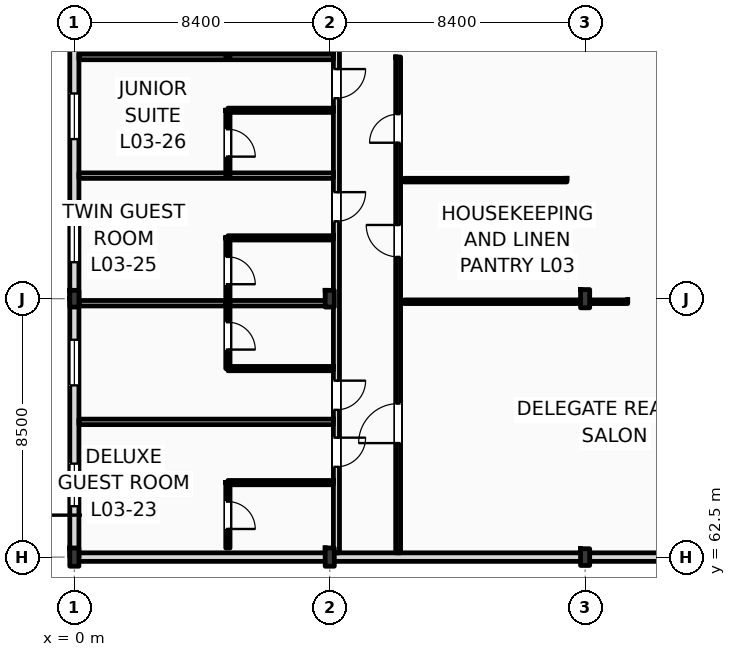
"""IFC4 building model, lengths in metres.
Left out: names, types, materials, properties, quantities, classifications, styles, units other than length and angle.
Written with IfcOpenShell. Run it as: python <this file> out.ifc"""

import sys

from ifc_helpers import new_model, si_unit, direction, frame, frame_2d, origin, origin_2d, place, context, subcontext, project, spatial, rectangle, i_section, extrude, element, fill, save


model = new_model("IFC4")
c1 = context("Model", 3, precision=1e-05, world=origin(), true_north=direction((0.0, 1.0)))
c2 = subcontext(c1, "Body", "Model", "MODEL_VIEW")
j1 = project(units=[si_unit("LENGTHUNIT", "METRE"), si_unit("PLANEANGLEUNIT", "RADIAN")], contexts=[c1])
p1 = place(None, origin())
s1 = spatial("IfcSite", under=j1, at=p1, CompositionType="ELEMENT")
p2 = place(p1, origin())
s2 = spatial("IfcBuilding", under=s1, at=p2, CompositionType="ELEMENT")
p3 = place(p2, frame((0.0, 0.0, 16.2)))
s3 = spatial("IfcBuildingStorey", under=s2, at=p3, CompositionType="ELEMENT", Elevation=16.2)
p4 = place(p3, frame((0.0, 62.5, 0.0), z_axis=(0.0, 0.0, 1.0), x_axis=(1.0, 0.0, 0.0)))
e1 = element("IfcColumn", 1, at=p4, inside=s3, PredefinedType="COLUMN", context=c2, shape_type="SweptSolid", body=[
    extrude(i_section(OverallWidth=0.3, OverallDepth=0.6, WebThickness=0.015, FlangeThickness=0.03, FilletRadius=0.027, at=origin_2d()), origin(), (0.0, 0.0, 1.0), 4.2),
])
p5 = place(p3, frame((0.0, 71.0, 0.0), z_axis=(0.0, 0.0, 1.0), x_axis=(1.0, 0.0, 0.0)))
e2 = element("IfcColumn", 2, at=p5, inside=s3, PredefinedType="COLUMN", context=c2, shape_type="SweptSolid", body=[
    extrude(i_section(OverallWidth=0.3, OverallDepth=0.55, WebThickness=0.015, FlangeThickness=0.029, FilletRadius=0.027, at=origin_2d()), origin(), (0.0, 0.0, 1.0), 4.2),
])
p6 = place(p3, frame((8.4, 62.5, 0.0), z_axis=(0.0, 0.0, 1.0), x_axis=(1.0, 0.0, 0.0)))
e3 = element("IfcColumn", 3, at=p6, inside=s3, PredefinedType="COLUMN", context=c2, shape_type="SweptSolid", body=[
    extrude(i_section(OverallWidth=0.3, OverallDepth=0.6, WebThickness=0.015, FlangeThickness=0.03, FilletRadius=0.027, at=origin_2d()), origin(), (0.0, 0.0, 1.0), 4.2),
])
for number, where, z_axis, x_axis in (
    (4, (8.4, 71.0, 0.0), (0.0, 0.0, 1.0), (1.0, 0.0, 0.0)),
    (5, (16.8, 62.5, 0.0), (0.0, 0.0, 1.0), (1.0, 0.0, 0.0)),
):
    element("IfcColumn", number, at=place(p3, frame(where, z_axis=z_axis, x_axis=x_axis)), inside=s3, PredefinedType="COLUMN", context=c2, shape_type="SweptSolid", body=[
        extrude(i_section(OverallWidth=0.3, OverallDepth=0.55, WebThickness=0.015, FlangeThickness=0.029, FilletRadius=0.027, at=origin_2d()), origin(), (0.0, 0.0, 1.0), 4.2),
    ])
p7 = place(p3, frame((16.8, 71.0, 0.0), z_axis=(0.0, 0.0, 1.0), x_axis=(1.0, 0.0, 0.0)))
e6 = element("IfcColumn", 6, at=p7, inside=s3, PredefinedType="COLUMN", context=c2, shape_type="SweptSolid", body=[
    extrude(i_section(OverallWidth=0.3, OverallDepth=0.6, WebThickness=0.015, FlangeThickness=0.03, FilletRadius=0.027, at=origin_2d()), origin(), (0.0, 0.0, 1.0), 4.2),
])
p8 = place(p3, frame((0.0, 62.5, 0.0), z_axis=(0.0, 0.0, 1.0), x_axis=(0.0, 1.0, 0.0)))
e7 = element("IfcWall", 7, at=p8, inside=s3, PredefinedType="STANDARD", context=c2, shape_type="SweptSolid", body=[
    extrude(rectangle(XDim=8.5, YDim=0.3, at=frame_2d((4.25, 0.0))), origin(), (0.0, 0.0, 1.0), 3.51),
])
p9 = place(p8, frame((1.674, 0.0, 0.9)))
e8 = element("IfcOpeningElement", 8, at=p9, cuts=e7, PredefinedType="OPENING", context=c2, shape_type="SweptSolid", body=[
    extrude(rectangle(XDim=1.4, YDim=1.7, at=frame_2d((0.7, 0.85))), frame((0.0, 0.16, 0.0), z_axis=(0.0, -1.0, 0.0), x_axis=(1.0, 0.0, 0.0)), (0.0, 0.0, 1.0), 0.32),
])
p10 = place(p8, frame((5.649, 0.0, 0.9)))
e9 = element("IfcOpeningElement", 9, at=p10, cuts=e7, PredefinedType="OPENING", context=c2, shape_type="SweptSolid", body=[
    extrude(rectangle(XDim=1.5, YDim=1.75, at=frame_2d((0.75, 0.875))), frame((0.0, 0.16, 0.0), z_axis=(0.0, -1.0, 0.0), x_axis=(1.0, 0.0, 0.0)), (0.0, 0.0, 1.0), 0.32),
])
p11 = place(p3, frame((0.0, 71.0, 0.0), z_axis=(0.0, 0.0, 1.0), x_axis=(0.0, 1.0, 0.0)))
e10 = element("IfcWall", 10, at=p11, inside=s3, PredefinedType="STANDARD", context=c2, shape_type="SweptSolid", body=[
    extrude(rectangle(XDim=8.5, YDim=0.3, at=frame_2d((4.25, 0.0))), origin(), (0.0, 0.0, 1.0), 3.51),
])
p12 = place(p11, frame((1.2, 0.0, 0.9)))
e11 = element("IfcOpeningElement", 11, at=p12, cuts=e10, PredefinedType="OPENING", context=c2, shape_type="SweptSolid", body=[
    extrude(rectangle(XDim=1.5, YDim=2.3, at=frame_2d((0.75, 1.15))), frame((0.0, 0.16, 0.0), z_axis=(0.0, -1.0, 0.0), x_axis=(1.0, 0.0, 0.0)), (0.0, 0.0, 1.0), 0.32),
])
p13 = place(p11, frame((5.25, 0.0, 0.9)))
e12 = element("IfcOpeningElement", 12, at=p13, cuts=e10, PredefinedType="OPENING", context=c2, shape_type="SweptSolid", body=[
    extrude(rectangle(XDim=1.5, YDim=2.43, at=frame_2d((0.75, 1.215))), frame((0.0, 0.16, 0.0), z_axis=(0.0, -1.0, 0.0), x_axis=(1.0, 0.0, 0.0)), (0.0, 0.0, 1.0), 0.32),
])
p14 = place(p3, frame((0.0, 62.5, 0.0), z_axis=(0.0, 0.0, 1.0), x_axis=(1.0, 0.0, 0.0)))
e13 = element("IfcWall", 13, at=p14, inside=s3, PredefinedType="STANDARD", context=c2, shape_type="SweptSolid", body=[
    extrude(rectangle(XDim=25.2, YDim=0.28, at=frame_2d((12.6, 0.0))), origin(), (0.0, 0.0, 1.0), 3.36),
])
p15 = place(p3, frame((8.62, 62.64, 0.0), z_axis=(0.0, 0.0, 1.0), x_axis=(0.0, 1.0, 0.0)))
e14 = element("IfcWall", 14, at=p15, inside=s3, PredefinedType="PARTITIONING", context=c2, shape_type="SweptSolid", body=[
    extrude(rectangle(XDim=32.66, YDim=0.2, at=frame_2d((16.33, 0.0))), origin(), (0.0, 0.0, 1.0), 3.51),
])
p16 = place(p15, frame((2.829, 0.0, 0.0)))
e15 = element("IfcOpeningElement", 15, at=p16, cuts=e14, PredefinedType="OPENING", context=c2, shape_type="SweptSolid", body=[
    extrude(rectangle(XDim=0.96, YDim=2.2, at=frame_2d((0.48, 1.1))), frame((0.0, 0.11, 0.0), z_axis=(0.0, -1.0, 0.0), x_axis=(1.0, 0.0, 0.0)), (0.0, 0.0, 1.0), 0.22),
])
p17 = place(p15, frame((4.704, 0.0, 0.0)))
e16 = element("IfcOpeningElement", 16, at=p17, cuts=e14, PredefinedType="OPENING", context=c2, shape_type="SweptSolid", body=[
    extrude(rectangle(XDim=0.96, YDim=2.2, at=frame_2d((0.48, 1.1))), frame((0.0, 0.11, 0.0), z_axis=(0.0, -1.0, 0.0), x_axis=(1.0, 0.0, 0.0)), (0.0, 0.0, 1.0), 0.22),
])
p18 = place(p15, frame((10.905, 0.0, 0.0)))
e17 = element("IfcOpeningElement", 17, at=p18, cuts=e14, PredefinedType="OPENING", context=c2, shape_type="SweptSolid", body=[
    extrude(rectangle(XDim=0.96, YDim=2.2, at=frame_2d((0.48, 1.1))), frame((0.0, 0.11, 0.0), z_axis=(0.0, -1.0, 0.0), x_axis=(1.0, 0.0, 0.0)), (0.0, 0.0, 1.0), 0.22),
])
p19 = place(p15, frame((14.954, 0.0, 0.0)))
e18 = element("IfcOpeningElement", 18, at=p19, cuts=e14, PredefinedType="OPENING", context=c2, shape_type="SweptSolid", body=[
    extrude(rectangle(XDim=0.96, YDim=2.2, at=frame_2d((0.48, 1.1))), frame((0.0, 0.11, 0.0), z_axis=(0.0, -1.0, 0.0), x_axis=(1.0, 0.0, 0.0)), (0.0, 0.0, 1.0), 0.22),
])
p20 = place(p15, frame((19.004, 0.0, 0.0)))
e19 = element("IfcOpeningElement", 19, at=p20, cuts=e14, PredefinedType="OPENING", context=c2, shape_type="SweptSolid", body=[
    extrude(rectangle(XDim=0.96, YDim=2.2, at=frame_2d((0.48, 1.1))), frame((0.0, 0.11, 0.0), z_axis=(0.0, -1.0, 0.0), x_axis=(1.0, 0.0, 0.0)), (0.0, 0.0, 1.0), 0.22),
])
p21 = place(p15, frame((23.055, 0.0, 0.0)))
e20 = element("IfcOpeningElement", 20, at=p21, cuts=e14, PredefinedType="OPENING", context=c2, shape_type="SweptSolid", body=[
    extrude(rectangle(XDim=0.96, YDim=2.2, at=frame_2d((0.48, 1.1))), frame((0.0, 0.11, 0.0), z_axis=(0.0, -1.0, 0.0), x_axis=(1.0, 0.0, 0.0)), (0.0, 0.0, 1.0), 0.22),
])
p22 = place(p15, frame((27.104, 0.0, 0.0)))
e21 = element("IfcOpeningElement", 21, at=p22, cuts=e14, PredefinedType="OPENING", context=c2, shape_type="SweptSolid", body=[
    extrude(rectangle(XDim=0.96, YDim=2.2, at=frame_2d((0.48, 1.1))), frame((0.0, 0.11, 0.0), z_axis=(0.0, -1.0, 0.0), x_axis=(1.0, 0.0, 0.0)), (0.0, 0.0, 1.0), 0.22),
])
p23 = place(p15, frame((31.179, 0.0, 0.0)))
e22 = element("IfcOpeningElement", 22, at=p23, cuts=e14, PredefinedType="OPENING", context=c2, shape_type="SweptSolid", body=[
    extrude(rectangle(XDim=0.96, YDim=2.2, at=frame_2d((0.48, 1.1))), frame((0.0, 0.11, 0.0), z_axis=(0.0, -1.0, 0.0), x_axis=(1.0, 0.0, 0.0)), (0.0, 0.0, 1.0), 0.22),
])
p24 = place(p3, frame((10.65, 62.64, 0.0), z_axis=(0.0, 0.0, 1.0), x_axis=(0.0, 1.0, 0.0)))
e23 = element("IfcWall", 23, at=p24, inside=s3, PredefinedType="PARTITIONING", context=c2, shape_type="SweptSolid", body=[
    extrude(rectangle(XDim=16.31, YDim=0.16, at=frame_2d((8.155, 0.0))), origin(), (0.0, 0.0, 1.0), 3.92),
])
p25 = place(p24, frame((3.61, 0.0, 0.0)))
e24 = element("IfcOpeningElement", 24, at=p25, cuts=e23, PredefinedType="OPENING", context=c2, shape_type="SweptSolid", body=[
    extrude(rectangle(XDim=1.3, YDim=2.2, at=frame_2d((0.65, 1.1))), frame((0.0, 0.09, 0.0), z_axis=(0.0, -1.0, 0.0), x_axis=(1.0, 0.0, 0.0)), (0.0, 0.0, 1.0), 0.18),
])
p26 = place(p24, frame((9.735, 0.0, 0.0)))
e25 = element("IfcOpeningElement", 25, at=p26, cuts=e23, PredefinedType="OPENING", context=c2, shape_type="SweptSolid", body=[
    extrude(rectangle(XDim=1.05, YDim=2.12, at=frame_2d((0.525, 1.06))), frame((0.0, 0.09, 0.0), z_axis=(0.0, -1.0, 0.0), x_axis=(1.0, 0.0, 0.0)), (0.0, 0.0, 1.0), 0.18),
])
p27 = place(p24, frame((13.49, 0.0, 0.0)))
e26 = element("IfcOpeningElement", 26, at=p27, cuts=e23, PredefinedType="OPENING", context=c2, shape_type="SweptSolid", body=[
    extrude(rectangle(XDim=0.94, YDim=2.15, at=frame_2d((0.47, 1.075))), frame((0.0, 0.09, 0.0), z_axis=(0.0, -1.0, 0.0), x_axis=(1.0, 0.0, 0.0)), (0.0, 0.0, 1.0), 0.18),
])
p28 = place(p3, frame((0.15, 66.948, 0.0), z_axis=(0.0, 0.0, 1.0), x_axis=(1.0, 0.0, 0.0)))
e27 = element("IfcWall", 27, at=p28, inside=s3, PredefinedType="PARTITIONING", context=c2, shape_type="SweptSolid", body=[
    extrude(rectangle(XDim=8.37, YDim=0.18, at=frame_2d((4.185, 0.0))), origin(), (0.0, 0.0, 1.0), 3.92),
])
p29 = place(p3, frame((5.05, 64.95, 0.0), z_axis=(0.0, 0.0, 1.0), x_axis=(1.0, 0.0, 0.0)))
e28 = element("IfcWall", 28, at=p29, inside=s3, PredefinedType="PARTITIONING", context=c2, shape_type="SweptSolid", body=[
    extrude(rectangle(XDim=3.47, YDim=0.14, at=frame_2d((1.735, 0.0))), origin(), (0.0, 0.0, 1.0), 3.92),
])
p30 = place(p3, frame((5.05, 62.8, 0.0), z_axis=(0.0, 0.0, 1.0), x_axis=(0.0, 1.0, 0.0)))
e29 = element("IfcWall", 29, at=p30, inside=s3, PredefinedType="PARTITIONING", context=c2, shape_type="SweptSolid", body=[
    extrude(rectangle(XDim=2.15, YDim=0.14, at=frame_2d((1.075, 0.0))), origin(), (0.0, 0.0, 1.0), 3.92),
])
p31 = place(p30, frame((0.625, 0.0, 0.0)))
e30 = element("IfcOpeningElement", 30, at=p31, cuts=e29, PredefinedType="OPENING", context=c2, shape_type="SweptSolid", body=[
    extrude(rectangle(XDim=0.9, YDim=2.1, at=frame_2d((0.45, 1.05))), frame((0.0, 0.08, 0.0), z_axis=(0.0, -1.0, 0.0), x_axis=(1.0, 0.0, 0.0)), (0.0, 0.0, 1.0), 0.16),
])
p32 = place(p3, frame((0.15, 70.851, 0.0), z_axis=(0.0, 0.0, 1.0), x_axis=(1.0, 0.0, 0.0)))
e31 = element("IfcWall", 31, at=p32, inside=s3, PredefinedType="PARTITIONING", context=c2, shape_type="SweptSolid", body=[
    extrude(rectangle(XDim=8.37, YDim=0.18, at=frame_2d((4.185, 0.0))), origin(), (0.0, 0.0, 1.0), 3.36),
])
p33 = place(p3, frame((5.05, 68.701, 0.0), z_axis=(0.0, 0.0, 1.0), x_axis=(1.0, 0.0, 0.0)))
e32 = element("IfcWall", 32, at=p33, inside=s3, PredefinedType="PARTITIONING", context=c2, shape_type="SweptSolid", body=[
    extrude(rectangle(XDim=3.47, YDim=0.14, at=frame_2d((1.735, 0.0))), origin(), (0.0, 0.0, 1.0), 3.92),
])
p34 = place(p3, frame((5.05, 68.701, 0.0), z_axis=(0.0, 0.0, 1.0), x_axis=(0.0, 1.0, 0.0)))
e33 = element("IfcWall", 33, at=p34, inside=s3, PredefinedType="PARTITIONING", context=c2, shape_type="SweptSolid", body=[
    extrude(rectangle(XDim=2.15, YDim=0.14, at=frame_2d((1.075, 0.0))), origin(), (0.0, 0.0, 1.0), 3.92),
])
p35 = place(p34, frame((0.625, 0.0, 0.0)))
e34 = element("IfcOpeningElement", 34, at=p35, cuts=e33, PredefinedType="OPENING", context=c2, shape_type="SweptSolid", body=[
    extrude(rectangle(XDim=0.9, YDim=2.1, at=frame_2d((0.45, 1.05))), frame((0.0, 0.08, 0.0), z_axis=(0.0, -1.0, 0.0), x_axis=(1.0, 0.0, 0.0)), (0.0, 0.0, 1.0), 0.16),
])
p36 = place(p3, frame((0.15, 75.048, 0.0), z_axis=(0.0, 0.0, 1.0), x_axis=(1.0, 0.0, 0.0)))
e35 = element("IfcWall", 35, at=p36, inside=s3, PredefinedType="PARTITIONING", context=c2, shape_type="SweptSolid", body=[
    extrude(rectangle(XDim=8.37, YDim=0.18, at=frame_2d((4.185, 0.0))), origin(), (0.0, 0.0, 1.0), 3.92),
])
p37 = place(p3, frame((5.05, 73.001, 0.0), z_axis=(0.0, 0.0, 1.0), x_axis=(1.0, 0.0, 0.0)))
e36 = element("IfcWall", 36, at=p37, inside=s3, PredefinedType="PARTITIONING", context=c2, shape_type="SweptSolid", body=[
    extrude(rectangle(XDim=3.47, YDim=0.14, at=frame_2d((1.735, 0.0))), origin(), (0.0, 0.0, 1.0), 3.92),
])
p38 = place(p3, frame((5.05, 70.851, 0.0), z_axis=(0.0, 0.0, 1.0), x_axis=(0.0, 1.0, 0.0)))
e37 = element("IfcWall", 37, at=p38, inside=s3, PredefinedType="PARTITIONING", context=c2, shape_type="SweptSolid", body=[
    extrude(rectangle(XDim=2.15, YDim=0.14, at=frame_2d((1.075, 0.0))), origin(), (0.0, 0.0, 1.0), 3.92),
])
p39 = place(p38, frame((0.625, 0.0, 0.0)))
e38 = element("IfcOpeningElement", 38, at=p39, cuts=e37, PredefinedType="OPENING", context=c2, shape_type="SweptSolid", body=[
    extrude(rectangle(XDim=0.9, YDim=2.1, at=frame_2d((0.45, 1.05))), frame((0.0, 0.08, 0.0), z_axis=(0.0, -1.0, 0.0), x_axis=(1.0, 0.0, 0.0)), (0.0, 0.0, 1.0), 0.16),
])
p40 = place(p3, frame((0.15, 78.951, 0.0), z_axis=(0.0, 0.0, 1.0), x_axis=(1.0, 0.0, 0.0)))
e39 = element("IfcWall", 39, at=p40, inside=s3, PredefinedType="PARTITIONING", context=c2, shape_type="SweptSolid", body=[
    extrude(rectangle(XDim=8.37, YDim=0.18, at=frame_2d((4.185, 0.0))), origin(), (0.0, 0.0, 1.0), 3.92),
])
p41 = place(p3, frame((5.05, 77.198, 0.0), z_axis=(0.0, 0.0, 1.0), x_axis=(1.0, 0.0, 0.0)))
e40 = element("IfcWall", 40, at=p41, inside=s3, PredefinedType="PARTITIONING", context=c2, shape_type="SweptSolid", body=[
    extrude(rectangle(XDim=3.47, YDim=0.14, at=frame_2d((1.735, 0.0))), origin(), (0.0, 0.0, 1.0), 3.92),
])
p42 = place(p3, frame((5.05, 75.048, 0.0), z_axis=(0.0, 0.0, 1.0), x_axis=(0.0, 1.0, 0.0)))
e41 = element("IfcWall", 41, at=p42, inside=s3, PredefinedType="PARTITIONING", context=c2, shape_type="SweptSolid", body=[
    extrude(rectangle(XDim=2.15, YDim=0.14, at=frame_2d((1.075, 0.0))), origin(), (0.0, 0.0, 1.0), 3.92),
])
p43 = place(p42, frame((0.625, 0.0, 0.0)))
e42 = element("IfcOpeningElement", 42, at=p43, cuts=e41, PredefinedType="OPENING", context=c2, shape_type="SweptSolid", body=[
    extrude(rectangle(XDim=0.9, YDim=2.1, at=frame_2d((0.45, 1.05))), frame((0.0, 0.08, 0.0), z_axis=(0.0, -1.0, 0.0), x_axis=(1.0, 0.0, 0.0)), (0.0, 0.0, 1.0), 0.16),
])
p44 = place(p3, frame((5.05, 78.951, 0.0), z_axis=(0.0, 0.0, 1.0), x_axis=(0.0, 1.0, 0.0)))
e43 = element("IfcWall", 43, at=p44, inside=s3, PredefinedType="PARTITIONING", context=c2, shape_type="SweptSolid", body=[
    extrude(rectangle(XDim=2.15, YDim=0.14, at=frame_2d((1.075, 0.0))), origin(), (0.0, 0.0, 1.0), 3.92),
])
p45 = place(p44, frame((0.625, 0.0, 0.0)))
e44 = element("IfcOpeningElement", 44, at=p45, cuts=e43, PredefinedType="OPENING", context=c2, shape_type="SweptSolid", body=[
    extrude(rectangle(XDim=0.9, YDim=2.1, at=frame_2d((0.45, 1.05))), frame((0.0, 0.08, 0.0), z_axis=(0.0, -1.0, 0.0), x_axis=(1.0, 0.0, 0.0)), (0.0, 0.0, 1.0), 0.16),
])
p46 = place(p3, frame((10.85, 70.9, 0.0), z_axis=(0.0, 0.0, 1.0), x_axis=(1.0, 0.0, 0.0)))
e45 = element("IfcWall", 45, at=p46, inside=s3, PredefinedType="PARTITIONING", context=c2, shape_type="SweptSolid", body=[
    extrude(rectangle(XDim=7.35, YDim=0.12, at=frame_2d((3.675, 0.0))), origin(), (0.0, 0.0, 1.0), 3.36),
])
p47 = place(p3, frame((10.85, 74.9, 0.0), z_axis=(0.0, 0.0, 1.0), x_axis=(1.0, 0.0, 0.0)))
e46 = element("IfcWall", 46, at=p47, inside=s3, PredefinedType="PARTITIONING", context=c2, shape_type="SweptSolid", body=[
    extrude(rectangle(XDim=5.35, YDim=0.12, at=frame_2d((2.675, 0.0))), origin(), (0.0, 0.0, 1.0), 3.92),
])
p48 = place(p9, origin())
e47 = element("IfcWindow", 47, at=p48, inside=s3, PartitioningType="DOUBLE_PANEL_VERTICAL", PredefinedType="WINDOW", context=c2, shape_type="SweptSolid", body=[
    extrude(rectangle(XDim=1.4, YDim=1.7, at=frame_2d((0.7, 0.85))), frame((0.0, 0.03, 0.0), z_axis=(0.0, -1.0, 0.0), x_axis=(1.0, 0.0, 0.0)), (0.0, 0.0, 1.0), 0.06),
])
fill(e8, e47)
p49 = place(p10, origin())
e48 = element("IfcWindow", 48, at=p49, inside=s3, PartitioningType="DOUBLE_PANEL_VERTICAL", PredefinedType="WINDOW", context=c2, shape_type="SweptSolid", body=[
    extrude(rectangle(XDim=1.5, YDim=1.75, at=frame_2d((0.75, 0.875))), frame((0.0, 0.03, 0.0), z_axis=(0.0, -1.0, 0.0), x_axis=(1.0, 0.0, 0.0)), (0.0, 0.0, 1.0), 0.06),
])
fill(e9, e48)
p50 = place(p12, origin())
e49 = element("IfcWindow", 49, at=p50, inside=s3, PartitioningType="DOUBLE_PANEL_VERTICAL", PredefinedType="WINDOW", context=c2, shape_type="SweptSolid", body=[
    extrude(rectangle(XDim=1.5, YDim=2.3, at=frame_2d((0.75, 1.15))), frame((0.0, 0.03, 0.0), z_axis=(0.0, -1.0, 0.0), x_axis=(1.0, 0.0, 0.0)), (0.0, 0.0, 1.0), 0.06),
])
fill(e11, e49)
p51 = place(p13, origin())
e50 = element("IfcWindow", 50, at=p51, inside=s3, PartitioningType="DOUBLE_PANEL_VERTICAL", PredefinedType="WINDOW", context=c2, shape_type="SweptSolid", body=[
    extrude(rectangle(XDim=1.5, YDim=2.43, at=frame_2d((0.75, 1.215))), frame((0.0, 0.03, 0.0), z_axis=(0.0, -1.0, 0.0), x_axis=(1.0, 0.0, 0.0)), (0.0, 0.0, 1.0), 0.06),
])
fill(e12, e50)
p52 = place(p16, frame((0.96, 0.0, 0.0), z_axis=(0.0, 0.0, 1.0), x_axis=(-1.0, 0.0, 0.0)))
e51 = element("IfcDoor", 51, at=p52, inside=s3, OperationType="SINGLE_SWING_RIGHT", PredefinedType="DOOR", context=c2, shape_type="SweptSolid", body=[
    extrude(rectangle(XDim=0.96, YDim=2.2, at=frame_2d((0.48, 1.1))), frame((0.0, 0.025, 0.0), z_axis=(0.0, -1.0, 0.0), x_axis=(1.0, 0.0, 0.0)), (0.0, 0.0, 1.0), 0.05),
])
fill(e15, e51)
p53 = place(p31, frame((0.9, 0.0, 0.0), z_axis=(0.0, 0.0, 1.0), x_axis=(-1.0, 0.0, 0.0)))
e52 = element("IfcDoor", 52, at=p53, inside=s3, OperationType="SINGLE_SWING_LEFT", PredefinedType="DOOR", context=c2, shape_type="SweptSolid", body=[
    extrude(rectangle(XDim=0.9, YDim=2.1, at=frame_2d((0.45, 1.05))), frame((0.0, 0.025, 0.0), z_axis=(0.0, -1.0, 0.0), x_axis=(1.0, 0.0, 0.0)), (0.0, 0.0, 1.0), 0.05),
])
fill(e30, e52)
p54 = place(p17, frame((0.96, 0.0, 0.0), z_axis=(0.0, 0.0, 1.0), x_axis=(-1.0, 0.0, 0.0)))
e53 = element("IfcDoor", 53, at=p54, inside=s3, OperationType="SINGLE_SWING_RIGHT", PredefinedType="DOOR", context=c2, shape_type="SweptSolid", body=[
    extrude(rectangle(XDim=0.96, YDim=2.2, at=frame_2d((0.48, 1.1))), frame((0.0, 0.025, 0.0), z_axis=(0.0, -1.0, 0.0), x_axis=(1.0, 0.0, 0.0)), (0.0, 0.0, 1.0), 0.05),
])
fill(e16, e53)
p55 = place(p35, frame((0.9, 0.0, 0.0), z_axis=(0.0, 0.0, 1.0), x_axis=(-1.0, 0.0, 0.0)))
e54 = element("IfcDoor", 54, at=p55, inside=s3, OperationType="SINGLE_SWING_LEFT", PredefinedType="DOOR", context=c2, shape_type="SweptSolid", body=[
    extrude(rectangle(XDim=0.9, YDim=2.1, at=frame_2d((0.45, 1.05))), frame((0.0, 0.025, 0.0), z_axis=(0.0, -1.0, 0.0), x_axis=(1.0, 0.0, 0.0)), (0.0, 0.0, 1.0), 0.05),
])
fill(e34, e54)
p56 = place(p18, frame((0.96, 0.0, 0.0), z_axis=(0.0, 0.0, 1.0), x_axis=(-1.0, 0.0, 0.0)))
e55 = element("IfcDoor", 55, at=p56, inside=s3, OperationType="SINGLE_SWING_RIGHT", PredefinedType="DOOR", context=c2, shape_type="SweptSolid", body=[
    extrude(rectangle(XDim=0.96, YDim=2.2, at=frame_2d((0.48, 1.1))), frame((0.0, 0.025, 0.0), z_axis=(0.0, -1.0, 0.0), x_axis=(1.0, 0.0, 0.0)), (0.0, 0.0, 1.0), 0.05),
])
fill(e17, e55)
p57 = place(p39, frame((0.9, 0.0, 0.0), z_axis=(0.0, 0.0, 1.0), x_axis=(-1.0, 0.0, 0.0)))
e56 = element("IfcDoor", 56, at=p57, inside=s3, OperationType="SINGLE_SWING_LEFT", PredefinedType="DOOR", context=c2, shape_type="SweptSolid", body=[
    extrude(rectangle(XDim=0.9, YDim=2.1, at=frame_2d((0.45, 1.05))), frame((0.0, 0.025, 0.0), z_axis=(0.0, -1.0, 0.0), x_axis=(1.0, 0.0, 0.0)), (0.0, 0.0, 1.0), 0.05),
])
fill(e38, e56)
p58 = place(p19, frame((0.96, 0.0, 0.0), z_axis=(0.0, 0.0, 1.0), x_axis=(-1.0, 0.0, 0.0)))
e57 = element("IfcDoor", 57, at=p58, inside=s3, OperationType="SINGLE_SWING_RIGHT", PredefinedType="DOOR", context=c2, shape_type="SweptSolid", body=[
    extrude(rectangle(XDim=0.96, YDim=2.2, at=frame_2d((0.48, 1.1))), frame((0.0, 0.025, 0.0), z_axis=(0.0, -1.0, 0.0), x_axis=(1.0, 0.0, 0.0)), (0.0, 0.0, 1.0), 0.05),
])
fill(e18, e57)
p59 = place(p43, frame((0.9, 0.0, 0.0), z_axis=(0.0, 0.0, 1.0), x_axis=(-1.0, 0.0, 0.0)))
e58 = element("IfcDoor", 58, at=p59, inside=s3, OperationType="SINGLE_SWING_LEFT", PredefinedType="DOOR", context=c2, shape_type="SweptSolid", body=[
    extrude(rectangle(XDim=0.9, YDim=2.1, at=frame_2d((0.45, 1.05))), frame((0.0, 0.025, 0.0), z_axis=(0.0, -1.0, 0.0), x_axis=(1.0, 0.0, 0.0)), (0.0, 0.0, 1.0), 0.05),
])
fill(e42, e58)
p60 = place(p25, origin())
e59 = element("IfcDoor", 59, at=p60, inside=s3, OperationType="SINGLE_SWING_LEFT", PredefinedType="DOOR", context=c2, shape_type="SweptSolid", body=[
    extrude(rectangle(XDim=1.3, YDim=2.2, at=frame_2d((0.65, 1.1))), frame((0.0, 0.025, 0.0), z_axis=(0.0, -1.0, 0.0), x_axis=(1.0, 0.0, 0.0)), (0.0, 0.0, 1.0), 0.05),
])
fill(e24, e59)
p61 = place(p26, origin())
e60 = element("IfcDoor", 60, at=p61, inside=s3, OperationType="SINGLE_SWING_RIGHT", PredefinedType="DOOR", context=c2, shape_type="SweptSolid", body=[
    extrude(rectangle(XDim=1.05, YDim=2.12, at=frame_2d((0.525, 1.06))), frame((0.0, 0.025, 0.0), z_axis=(0.0, -1.0, 0.0), x_axis=(1.0, 0.0, 0.0)), (0.0, 0.0, 1.0), 0.05),
])
fill(e25, e60)
p62 = place(p27, origin())
e61 = element("IfcDoor", 61, at=p62, inside=s3, OperationType="SINGLE_SWING_LEFT", PredefinedType="DOOR", context=c2, shape_type="SweptSolid", body=[
    extrude(rectangle(XDim=0.94, YDim=2.15, at=frame_2d((0.47, 1.075))), frame((0.0, 0.025, 0.0), z_axis=(0.0, -1.0, 0.0), x_axis=(1.0, 0.0, 0.0)), (0.0, 0.0, 1.0), 0.05),
])
fill(e26, e61)
save(model, sys.argv[1])
